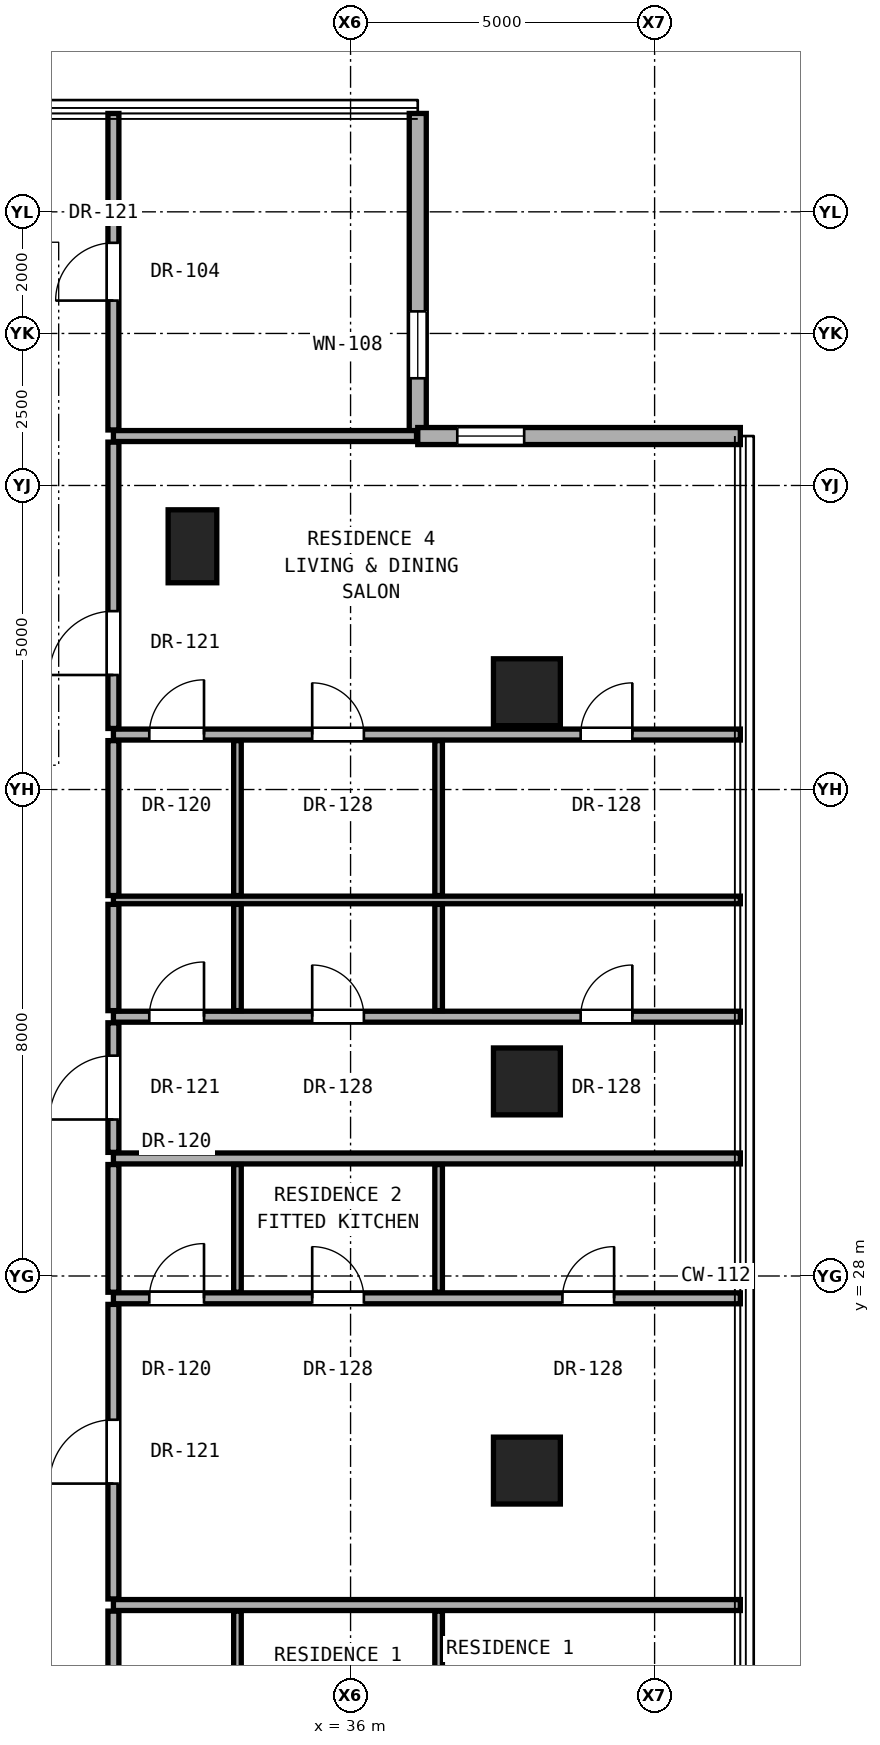
"""IFC4 building model, lengths in metres.
Left out: names, types, materials, properties, quantities, classifications, styles, units other than length and angle.
Written with IfcOpenShell. Run it as: python <this file> out.ifc"""

import sys

from ifc_helpers import new_model, si_unit, direction, frame, frame_2d, origin, origin_2d, place, context, subcontext, project, spatial, rectangle, hollow_rectangle, extrude, element, fill, save


model = new_model("IFC4")
c1 = context("Model", 3, precision=1e-05, world=origin(), true_north=direction((0.0, 1.0)))
c2 = subcontext(c1, "Body", "Model", "MODEL_VIEW")
j1 = project(units=[si_unit("LENGTHUNIT", "METRE"), si_unit("PLANEANGLEUNIT", "RADIAN")], contexts=[c1])
p1 = place(None, origin())
s1 = spatial("IfcSite", under=j1, at=p1, CompositionType="ELEMENT")
p2 = place(p1, origin())
s2 = spatial("IfcBuilding", under=s1, at=p2, CompositionType="ELEMENT")
p3 = place(p2, frame((0.0, 0.0, 108.2)))
s3 = spatial("IfcBuildingStorey", under=s2, at=p3, CompositionType="ELEMENT", Elevation=108.2)
for number, where, z_axis, x_axis in (
    (1, (38.9, 24.8, 0.0), (0.0, 0.0, 1.0), (1.0, 0.0, 0.0)),
    (2, (38.9, 31.2, 0.0), (0.0, 0.0, 1.0), (1.0, 0.0, 0.0)),
    (3, (38.9, 37.6, 0.0), (0.0, 0.0, 1.0), (1.0, 0.0, 0.0)),
):
    element("IfcColumn", number, at=place(p3, frame(where, z_axis=z_axis, x_axis=x_axis)), inside=s3, PredefinedType="COLUMN", context=c2, shape_type="SweptSolid", body=[
        extrude(hollow_rectangle(XDim=1.1, YDim=1.1, WallThickness=0.06, at=origin_2d()), origin(), (0.0, 0.0, 1.0), 3.3),
    ])
p4 = place(p3, frame((33.4, 40.0, 0.0), z_axis=(0.0, 0.0, 1.0), x_axis=(1.0, 0.0, 0.0)))
e4 = element("IfcColumn", 4, at=p4, inside=s3, PredefinedType="PILASTER", context=c2, shape_type="SweptSolid", body=[
    extrude(rectangle(XDim=0.8, YDim=1.2, at=origin_2d()), origin(), (0.0, 0.0, 1.0), 3.3),
])
p5 = place(p3, frame((37.105, 41.813, 0.0), z_axis=(0.0, 0.0, 1.0), x_axis=(0.0, 1.0, 0.0)))
e5 = element("IfcWall", 5, at=p5, inside=s3, PredefinedType="SOLIDWALL", context=c2, shape_type="SweptSolid", body=[
    extrude(rectangle(XDim=5.305, YDim=0.28, at=frame_2d((2.652, 0.0))), origin(), (0.0, 0.0, 1.0), 3.06),
])
p6 = place(p5, frame((0.95, 0.0, 0.85)))
e6 = element("IfcOpeningElement", 6, at=p6, cuts=e5, PredefinedType="OPENING", context=c2, shape_type="SweptSolid", body=[
    extrude(rectangle(XDim=1.1, YDim=2.0, at=frame_2d((0.55, 1.0))), frame((0.0, 0.15, 0.0), z_axis=(0.0, -1.0, 0.0), x_axis=(1.0, 0.0, 0.0)), (0.0, 0.0, 1.0), 0.3),
])
p7 = place(p3, frame((42.41, 41.813, 0.0), z_axis=(0.0, 0.0, 1.0), x_axis=(-1.0, 0.0, 0.0)))
e7 = element("IfcWall", 7, at=p7, inside=s3, PredefinedType="SOLIDWALL", context=c2, shape_type="SweptSolid", body=[
    extrude(rectangle(XDim=5.305, YDim=0.28, at=frame_2d((2.652, 0.0))), origin(), (0.0, 0.0, 1.0), 3.06),
])
p8 = place(p7, frame((3.555, 0.0, 0.85)))
e8 = element("IfcOpeningElement", 8, at=p8, cuts=e7, PredefinedType="OPENING", context=c2, shape_type="SweptSolid", body=[
    extrude(rectangle(XDim=1.1, YDim=2.0, at=frame_2d((0.55, 1.0))), frame((0.0, 0.15, 0.0), z_axis=(0.0, -1.0, 0.0), x_axis=(1.0, 0.0, 0.0)), (0.0, 0.0, 1.0), 0.3),
])
p9 = place(p3, frame((32.1, 22.589, 0.0), z_axis=(0.0, 0.0, 1.0), x_axis=(1.0, 0.0, 0.0)))
e9 = element("IfcWall", 9, at=p9, inside=s3, PredefinedType="PARTITIONING", context=c2, shape_type="SweptSolid", body=[
    extrude(rectangle(XDim=10.31, YDim=0.18, at=frame_2d((5.155, 0.0))), origin(), (0.0, 0.0, 1.0), 2.145),
])
p10 = place(p3, frame((32.1, 27.633, 0.0), z_axis=(0.0, 0.0, 1.0), x_axis=(1.0, 0.0, 0.0)))
e10 = element("IfcWall", 10, at=p10, inside=s3, PredefinedType="PARTITIONING", context=c2, shape_type="SweptSolid", body=[
    extrude(rectangle(XDim=10.31, YDim=0.18, at=frame_2d((5.155, 0.0))), origin(), (0.0, 0.0, 1.0), 2.145),
])
p11 = place(p10, frame((7.384, 0.0, 0.0)))
e11 = element("IfcOpeningElement", 11, at=p11, cuts=e10, PredefinedType="OPENING", context=c2, shape_type="SweptSolid", body=[
    extrude(rectangle(XDim=0.85, YDim=2.01, at=frame_2d((0.425, 1.005))), frame((0.0, 0.1, 0.0), z_axis=(0.0, -1.0, 0.0), x_axis=(1.0, 0.0, 0.0)), (0.0, 0.0, 1.0), 0.2),
])
p12 = place(p10, frame((3.269, 0.0, 0.0)))
e12 = element("IfcOpeningElement", 12, at=p12, cuts=e10, PredefinedType="OPENING", context=c2, shape_type="SweptSolid", body=[
    extrude(rectangle(XDim=0.85, YDim=2.01, at=frame_2d((0.425, 1.005))), frame((0.0, 0.1, 0.0), z_axis=(0.0, -1.0, 0.0), x_axis=(1.0, 0.0, 0.0)), (0.0, 0.0, 1.0), 0.2),
])
p13 = place(p10, frame((0.59, 0.0, 0.0)))
e13 = element("IfcOpeningElement", 13, at=p13, cuts=e10, PredefinedType="OPENING", context=c2, shape_type="SweptSolid", body=[
    extrude(rectangle(XDim=0.9, YDim=2.1, at=frame_2d((0.45, 1.05))), frame((0.0, 0.1, 0.0), z_axis=(0.0, -1.0, 0.0), x_axis=(1.0, 0.0, 0.0)), (0.0, 0.0, 1.0), 0.2),
])
p14 = place(p3, frame((32.1, 29.933, 0.0), z_axis=(0.0, 0.0, 1.0), x_axis=(1.0, 0.0, 0.0)))
e14 = element("IfcWall", 14, at=p14, inside=s3, PredefinedType="PARTITIONING", context=c2, shape_type="SweptSolid", body=[
    extrude(rectangle(XDim=10.31, YDim=0.18, at=frame_2d((5.155, 0.0))), origin(), (0.0, 0.0, 1.0), 2.145),
])
p15 = place(p3, frame((32.1, 32.264, 0.0), z_axis=(0.0, 0.0, 1.0), x_axis=(1.0, 0.0, 0.0)))
e15 = element("IfcWall", 15, at=p15, inside=s3, PredefinedType="PARTITIONING", context=c2, shape_type="SweptSolid", body=[
    extrude(rectangle(XDim=10.31, YDim=0.18, at=frame_2d((5.155, 0.0))), origin(), (0.0, 0.0, 1.0), 2.145),
])
p16 = place(p15, frame((7.684, 0.0, 0.0)))
e16 = element("IfcOpeningElement", 16, at=p16, cuts=e15, PredefinedType="OPENING", context=c2, shape_type="SweptSolid", body=[
    extrude(rectangle(XDim=0.85, YDim=2.01, at=frame_2d((0.425, 1.005))), frame((0.0, 0.1, 0.0), z_axis=(0.0, -1.0, 0.0), x_axis=(1.0, 0.0, 0.0)), (0.0, 0.0, 1.0), 0.2),
])
p17 = place(p15, frame((3.269, 0.0, 0.0)))
e17 = element("IfcOpeningElement", 17, at=p17, cuts=e15, PredefinedType="OPENING", context=c2, shape_type="SweptSolid", body=[
    extrude(rectangle(XDim=0.85, YDim=2.01, at=frame_2d((0.425, 1.005))), frame((0.0, 0.1, 0.0), z_axis=(0.0, -1.0, 0.0), x_axis=(1.0, 0.0, 0.0)), (0.0, 0.0, 1.0), 0.2),
])
p18 = place(p15, frame((0.59, 0.0, 0.0)))
e18 = element("IfcOpeningElement", 18, at=p18, cuts=e15, PredefinedType="OPENING", context=c2, shape_type="SweptSolid", body=[
    extrude(rectangle(XDim=0.9, YDim=2.1, at=frame_2d((0.45, 1.05))), frame((0.0, 0.1, 0.0), z_axis=(0.0, -1.0, 0.0), x_axis=(1.0, 0.0, 0.0)), (0.0, 0.0, 1.0), 0.2),
])
p19 = place(p3, frame((32.1, 34.184, 0.0), z_axis=(0.0, 0.0, 1.0), x_axis=(1.0, 0.0, 0.0)))
e19 = element("IfcWall", 19, at=p19, inside=s3, PredefinedType="PARTITIONING", context=c2, shape_type="SweptSolid", body=[
    extrude(rectangle(XDim=10.31, YDim=0.125, at=frame_2d((5.155, 0.0))), origin(), (0.0, 0.0, 1.0), 2.145),
])
p20 = place(p3, frame((32.1, 36.904, 0.0), z_axis=(0.0, 0.0, 1.0), x_axis=(1.0, 0.0, 0.0)))
e20 = element("IfcWall", 20, at=p20, inside=s3, PredefinedType="PARTITIONING", context=c2, shape_type="SweptSolid", body=[
    extrude(rectangle(XDim=10.31, YDim=0.18, at=frame_2d((5.155, 0.0))), origin(), (0.0, 0.0, 1.0), 2.145),
])
p21 = place(p20, frame((7.684, 0.0, 0.0)))
e21 = element("IfcOpeningElement", 21, at=p21, cuts=e20, PredefinedType="OPENING", context=c2, shape_type="SweptSolid", body=[
    extrude(rectangle(XDim=0.85, YDim=2.01, at=frame_2d((0.425, 1.005))), frame((0.0, 0.1, 0.0), z_axis=(0.0, -1.0, 0.0), x_axis=(1.0, 0.0, 0.0)), (0.0, 0.0, 1.0), 0.2),
])
p22 = place(p20, frame((3.269, 0.0, 0.0)))
e22 = element("IfcOpeningElement", 22, at=p22, cuts=e20, PredefinedType="OPENING", context=c2, shape_type="SweptSolid", body=[
    extrude(rectangle(XDim=0.85, YDim=2.01, at=frame_2d((0.425, 1.005))), frame((0.0, 0.1, 0.0), z_axis=(0.0, -1.0, 0.0), x_axis=(1.0, 0.0, 0.0)), (0.0, 0.0, 1.0), 0.2),
])
p23 = place(p20, frame((0.59, 0.0, 0.0)))
e23 = element("IfcOpeningElement", 23, at=p23, cuts=e20, PredefinedType="OPENING", context=c2, shape_type="SweptSolid", body=[
    extrude(rectangle(XDim=0.9, YDim=2.1, at=frame_2d((0.45, 1.05))), frame((0.0, 0.1, 0.0), z_axis=(0.0, -1.0, 0.0), x_axis=(1.0, 0.0, 0.0)), (0.0, 0.0, 1.0), 0.2),
])
p24 = place(p3, frame((32.1, 41.813, 0.0), z_axis=(0.0, 0.0, 1.0), x_axis=(1.0, 0.0, 0.0)))
e24 = element("IfcWall", 24, at=p24, inside=s3, PredefinedType="PARTITIONING", context=c2, shape_type="SweptSolid", body=[
    extrude(rectangle(XDim=4.985, YDim=0.18, at=frame_2d((2.492, 0.0))), origin(), (0.0, 0.0, 1.0), 3.08),
])
p25 = place(p3, frame((32.1, 19.969, 0.0), z_axis=(0.0, 0.0, 1.0), x_axis=(0.0, 1.0, 0.0)))
e25 = element("IfcWall", 25, at=p25, inside=s3, PredefinedType="PARTITIONING", context=c2, shape_type="SweptSolid", body=[
    extrude(rectangle(XDim=2.52, YDim=0.18, at=frame_2d((1.26, 0.0))), origin(), (0.0, 0.0, 1.0), 3.08),
])
p26 = place(p3, frame((32.1, 22.689, 0.0), z_axis=(0.0, 0.0, 1.0), x_axis=(0.0, 1.0, 0.0)))
e26 = element("IfcWall", 26, at=p26, inside=s3, PredefinedType="PARTITIONING", context=c2, shape_type="SweptSolid", body=[
    extrude(rectangle(XDim=4.844, YDim=0.18, at=frame_2d((2.422, 0.0))), origin(), (0.0, 0.0, 1.0), 2.299),
])
p27 = place(p26, frame((1.897, 0.0, 0.0)))
e27 = element("IfcOpeningElement", 27, at=p27, cuts=e26, PredefinedType="OPENING", context=c2, shape_type="SweptSolid", body=[
    extrude(rectangle(XDim=1.05, YDim=2.2, at=frame_2d((0.525, 1.1))), frame((0.0, 0.1, 0.0), z_axis=(0.0, -1.0, 0.0), x_axis=(1.0, 0.0, 0.0)), (0.0, 0.0, 1.0), 0.2),
])
p28 = place(p3, frame((32.1, 27.733, 0.0), z_axis=(0.0, 0.0, 1.0), x_axis=(0.0, 1.0, 0.0)))
e28 = element("IfcWall", 28, at=p28, inside=s3, PredefinedType="PARTITIONING", context=c2, shape_type="SweptSolid", body=[
    extrude(rectangle(XDim=2.1, YDim=0.18, at=frame_2d((1.05, 0.0))), origin(), (0.0, 0.0, 1.0), 3.08),
])
p29 = place(p3, frame((32.1, 30.033, 0.0), z_axis=(0.0, 0.0, 1.0), x_axis=(0.0, 1.0, 0.0)))
e29 = element("IfcWall", 29, at=p29, inside=s3, PredefinedType="PARTITIONING", context=c2, shape_type="SweptSolid", body=[
    extrude(rectangle(XDim=2.131, YDim=0.18, at=frame_2d((1.065, 0.0))), origin(), (0.0, 0.0, 1.0), 2.299),
])
p30 = place(p29, frame((0.541, 0.0, 0.0)))
e30 = element("IfcOpeningElement", 30, at=p30, cuts=e29, PredefinedType="OPENING", context=c2, shape_type="SweptSolid", body=[
    extrude(rectangle(XDim=1.05, YDim=2.2, at=frame_2d((0.525, 1.1))), frame((0.0, 0.1, 0.0), z_axis=(0.0, -1.0, 0.0), x_axis=(1.0, 0.0, 0.0)), (0.0, 0.0, 1.0), 0.2),
])
p31 = place(p3, frame((32.1, 32.364, 0.0), z_axis=(0.0, 0.0, 1.0), x_axis=(0.0, 1.0, 0.0)))
e31 = element("IfcWall", 31, at=p31, inside=s3, PredefinedType="PARTITIONING", context=c2, shape_type="SweptSolid", body=[
    extrude(rectangle(XDim=1.748, YDim=0.18, at=frame_2d((0.874, 0.0))), origin(), (0.0, 0.0, 1.0), 3.08),
])
p32 = place(p3, frame((32.1, 34.257, 0.0), z_axis=(0.0, 0.0, 1.0), x_axis=(0.0, 1.0, 0.0)))
e32 = element("IfcWall", 32, at=p32, inside=s3, PredefinedType="PARTITIONING", context=c2, shape_type="SweptSolid", body=[
    extrude(rectangle(XDim=2.547, YDim=0.18, at=frame_2d((1.274, 0.0))), origin(), (0.0, 0.0, 1.0), 3.08),
])
p33 = place(p3, frame((32.1, 37.004, 0.0), z_axis=(0.0, 0.0, 1.0), x_axis=(0.0, 1.0, 0.0)))
e33 = element("IfcWall", 33, at=p33, inside=s3, PredefinedType="PARTITIONING", context=c2, shape_type="SweptSolid", body=[
    extrude(rectangle(XDim=4.709, YDim=0.18, at=frame_2d((2.354, 0.0))), origin(), (0.0, 0.0, 1.0), 2.456),
])
p34 = place(p33, frame((0.879, 0.0, 0.0)))
e34 = element("IfcOpeningElement", 34, at=p34, cuts=e33, PredefinedType="OPENING", context=c2, shape_type="SweptSolid", body=[
    extrude(rectangle(XDim=1.05, YDim=2.2, at=frame_2d((0.525, 1.1))), frame((0.0, 0.1, 0.0), z_axis=(0.0, -1.0, 0.0), x_axis=(1.0, 0.0, 0.0)), (0.0, 0.0, 1.0), 0.2),
])
p35 = place(p3, frame((32.1, 41.913, 0.0), z_axis=(0.0, 0.0, 1.0), x_axis=(0.0, 1.0, 0.0)))
e35 = element("IfcWall", 35, at=p35, inside=s3, PredefinedType="PARTITIONING", context=c2, shape_type="SweptSolid", body=[
    extrude(rectangle(XDim=5.205, YDim=0.18, at=frame_2d((2.603, 0.0))), origin(), (0.0, 0.0, 1.0), 3.08),
])
p36 = place(p35, frame((2.127, 0.0, 0.0)))
e36 = element("IfcOpeningElement", 36, at=p36, cuts=e35, PredefinedType="OPENING", context=c2, shape_type="SweptSolid", body=[
    extrude(rectangle(XDim=0.95, YDim=2.15, at=frame_2d((0.475, 1.075))), frame((0.0, 0.1, 0.0), z_axis=(0.0, -1.0, 0.0), x_axis=(1.0, 0.0, 0.0)), (0.0, 0.0, 1.0), 0.2),
])
p37 = place(p3, frame((34.14, 19.969, 0.0), z_axis=(0.0, 0.0, 1.0), x_axis=(0.0, 1.0, 0.0)))
e37 = element("IfcWall", 37, at=p37, inside=s3, PredefinedType="PARTITIONING", context=c2, shape_type="SweptSolid", body=[
    extrude(rectangle(XDim=2.52, YDim=0.125, at=frame_2d((1.26, 0.0))), origin(), (0.0, 0.0, 1.0), 3.08),
])
p38 = place(p3, frame((34.14, 27.733, 0.0), z_axis=(0.0, 0.0, 1.0), x_axis=(0.0, 1.0, 0.0)))
e38 = element("IfcWall", 38, at=p38, inside=s3, PredefinedType="PARTITIONING", context=c2, shape_type="SweptSolid", body=[
    extrude(rectangle(XDim=2.1, YDim=0.125, at=frame_2d((1.05, 0.0))), origin(), (0.0, 0.0, 1.0), 3.08),
])
p39 = place(p3, frame((34.14, 32.364, 0.0), z_axis=(0.0, 0.0, 1.0), x_axis=(0.0, 1.0, 0.0)))
e39 = element("IfcWall", 39, at=p39, inside=s3, PredefinedType="PARTITIONING", context=c2, shape_type="SweptSolid", body=[
    extrude(rectangle(XDim=1.748, YDim=0.125, at=frame_2d((0.874, 0.0))), origin(), (0.0, 0.0, 1.0), 3.08),
])
p40 = place(p3, frame((34.14, 34.257, 0.0), z_axis=(0.0, 0.0, 1.0), x_axis=(0.0, 1.0, 0.0)))
e40 = element("IfcWall", 40, at=p40, inside=s3, PredefinedType="PARTITIONING", context=c2, shape_type="SweptSolid", body=[
    extrude(rectangle(XDim=2.547, YDim=0.125, at=frame_2d((1.274, 0.0))), origin(), (0.0, 0.0, 1.0), 3.08),
])
p41 = place(p3, frame((37.448, 19.969, 0.0), z_axis=(0.0, 0.0, 1.0), x_axis=(0.0, 1.0, 0.0)))
e41 = element("IfcWall", 41, at=p41, inside=s3, PredefinedType="PARTITIONING", context=c2, shape_type="SweptSolid", body=[
    extrude(rectangle(XDim=2.52, YDim=0.125, at=frame_2d((1.26, 0.0))), origin(), (0.0, 0.0, 1.0), 3.08),
])
p42 = place(p3, frame((37.448, 27.733, 0.0), z_axis=(0.0, 0.0, 1.0), x_axis=(0.0, 1.0, 0.0)))
e42 = element("IfcWall", 42, at=p42, inside=s3, PredefinedType="PARTITIONING", context=c2, shape_type="SweptSolid", body=[
    extrude(rectangle(XDim=2.1, YDim=0.125, at=frame_2d((1.05, 0.0))), origin(), (0.0, 0.0, 1.0), 3.08),
])
p43 = place(p3, frame((37.448, 32.364, 0.0), z_axis=(0.0, 0.0, 1.0), x_axis=(0.0, 1.0, 0.0)))
e43 = element("IfcWall", 43, at=p43, inside=s3, PredefinedType="PARTITIONING", context=c2, shape_type="SweptSolid", body=[
    extrude(rectangle(XDim=1.748, YDim=0.125, at=frame_2d((0.874, 0.0))), origin(), (0.0, 0.0, 1.0), 3.08),
])
p44 = place(p3, frame((37.448, 34.257, 0.0), z_axis=(0.0, 0.0, 1.0), x_axis=(0.0, 1.0, 0.0)))
e44 = element("IfcWall", 44, at=p44, inside=s3, PredefinedType="PARTITIONING", context=c2, shape_type="SweptSolid", body=[
    extrude(rectangle(XDim=2.547, YDim=0.125, at=frame_2d((1.274, 0.0))), origin(), (0.0, 0.0, 1.0), 3.08),
])
p45 = place(p6, origin())
e45 = element("IfcWindow", 45, at=p45, inside=s3, PartitioningType="SINGLE_PANEL", PredefinedType="WINDOW", context=c2, shape_type="SweptSolid", body=[
    extrude(rectangle(XDim=1.1, YDim=2.0, at=frame_2d((0.55, 1.0))), frame((0.0, 0.03, 0.0), z_axis=(0.0, -1.0, 0.0), x_axis=(1.0, 0.0, 0.0)), (0.0, 0.0, 1.0), 0.06),
])
fill(e6, e45)
p46 = place(p8, origin())
e46 = element("IfcWindow", 46, at=p46, inside=s3, PartitioningType="SINGLE_PANEL", PredefinedType="WINDOW", context=c2, shape_type="SweptSolid", body=[
    extrude(rectangle(XDim=1.1, YDim=2.0, at=frame_2d((0.55, 1.0))), frame((0.0, 0.03, 0.0), z_axis=(0.0, -1.0, 0.0), x_axis=(1.0, 0.0, 0.0)), (0.0, 0.0, 1.0), 0.06),
])
fill(e8, e46)
p47 = place(p27, origin())
e47 = element("IfcDoor", 47, at=p47, inside=s3, OperationType="SINGLE_SWING_LEFT", PredefinedType="DOOR", context=c2, shape_type="SweptSolid", body=[
    extrude(rectangle(XDim=1.05, YDim=2.2, at=frame_2d((0.525, 1.1))), frame((0.0, 0.025, 0.0), z_axis=(0.0, -1.0, 0.0), x_axis=(1.0, 0.0, 0.0)), (0.0, 0.0, 1.0), 0.05),
])
fill(e27, e47)
p48 = place(p11, origin())
e48 = element("IfcDoor", 48, at=p48, inside=s3, OperationType="SINGLE_SWING_RIGHT", PredefinedType="DOOR", context=c2, shape_type="SweptSolid", body=[
    extrude(rectangle(XDim=0.85, YDim=2.01, at=frame_2d((0.425, 1.005))), frame((0.0, 0.025, 0.0), z_axis=(0.0, -1.0, 0.0), x_axis=(1.0, 0.0, 0.0)), (0.0, 0.0, 1.0), 0.05),
])
fill(e11, e48)
p49 = place(p12, origin())
e49 = element("IfcDoor", 49, at=p49, inside=s3, OperationType="SINGLE_SWING_LEFT", PredefinedType="DOOR", context=c2, shape_type="SweptSolid", body=[
    extrude(rectangle(XDim=0.85, YDim=2.01, at=frame_2d((0.425, 1.005))), frame((0.0, 0.025, 0.0), z_axis=(0.0, -1.0, 0.0), x_axis=(1.0, 0.0, 0.0)), (0.0, 0.0, 1.0), 0.05),
])
fill(e12, e49)
p50 = place(p13, origin())
e50 = element("IfcDoor", 50, at=p50, inside=s3, OperationType="SINGLE_SWING_RIGHT", PredefinedType="DOOR", context=c2, shape_type="SweptSolid", body=[
    extrude(rectangle(XDim=0.9, YDim=2.1, at=frame_2d((0.45, 1.05))), frame((0.0, 0.025, 0.0), z_axis=(0.0, -1.0, 0.0), x_axis=(1.0, 0.0, 0.0)), (0.0, 0.0, 1.0), 0.05),
])
fill(e13, e50)
p51 = place(p30, origin())
e51 = element("IfcDoor", 51, at=p51, inside=s3, OperationType="SINGLE_SWING_LEFT", PredefinedType="DOOR", context=c2, shape_type="SweptSolid", body=[
    extrude(rectangle(XDim=1.05, YDim=2.2, at=frame_2d((0.525, 1.1))), frame((0.0, 0.025, 0.0), z_axis=(0.0, -1.0, 0.0), x_axis=(1.0, 0.0, 0.0)), (0.0, 0.0, 1.0), 0.05),
])
fill(e30, e51)
p52 = place(p16, origin())
e52 = element("IfcDoor", 52, at=p52, inside=s3, OperationType="SINGLE_SWING_RIGHT", PredefinedType="DOOR", context=c2, shape_type="SweptSolid", body=[
    extrude(rectangle(XDim=0.85, YDim=2.01, at=frame_2d((0.425, 1.005))), frame((0.0, 0.025, 0.0), z_axis=(0.0, -1.0, 0.0), x_axis=(1.0, 0.0, 0.0)), (0.0, 0.0, 1.0), 0.05),
])
fill(e16, e52)
p53 = place(p17, origin())
e53 = element("IfcDoor", 53, at=p53, inside=s3, OperationType="SINGLE_SWING_LEFT", PredefinedType="DOOR", context=c2, shape_type="SweptSolid", body=[
    extrude(rectangle(XDim=0.85, YDim=2.01, at=frame_2d((0.425, 1.005))), frame((0.0, 0.025, 0.0), z_axis=(0.0, -1.0, 0.0), x_axis=(1.0, 0.0, 0.0)), (0.0, 0.0, 1.0), 0.05),
])
fill(e17, e53)
p54 = place(p18, origin())
e54 = element("IfcDoor", 54, at=p54, inside=s3, OperationType="SINGLE_SWING_RIGHT", PredefinedType="DOOR", context=c2, shape_type="SweptSolid", body=[
    extrude(rectangle(XDim=0.9, YDim=2.1, at=frame_2d((0.45, 1.05))), frame((0.0, 0.025, 0.0), z_axis=(0.0, -1.0, 0.0), x_axis=(1.0, 0.0, 0.0)), (0.0, 0.0, 1.0), 0.05),
])
fill(e18, e54)
p55 = place(p34, origin())
e55 = element("IfcDoor", 55, at=p55, inside=s3, OperationType="SINGLE_SWING_LEFT", PredefinedType="DOOR", context=c2, shape_type="SweptSolid", body=[
    extrude(rectangle(XDim=1.05, YDim=2.2, at=frame_2d((0.525, 1.1))), frame((0.0, 0.025, 0.0), z_axis=(0.0, -1.0, 0.0), x_axis=(1.0, 0.0, 0.0)), (0.0, 0.0, 1.0), 0.05),
])
fill(e34, e55)
p56 = place(p21, origin())
e56 = element("IfcDoor", 56, at=p56, inside=s3, OperationType="SINGLE_SWING_RIGHT", PredefinedType="DOOR", context=c2, shape_type="SweptSolid", body=[
    extrude(rectangle(XDim=0.85, YDim=2.01, at=frame_2d((0.425, 1.005))), frame((0.0, 0.025, 0.0), z_axis=(0.0, -1.0, 0.0), x_axis=(1.0, 0.0, 0.0)), (0.0, 0.0, 1.0), 0.05),
])
fill(e21, e56)
p57 = place(p22, origin())
e57 = element("IfcDoor", 57, at=p57, inside=s3, OperationType="SINGLE_SWING_LEFT", PredefinedType="DOOR", context=c2, shape_type="SweptSolid", body=[
    extrude(rectangle(XDim=0.85, YDim=2.01, at=frame_2d((0.425, 1.005))), frame((0.0, 0.025, 0.0), z_axis=(0.0, -1.0, 0.0), x_axis=(1.0, 0.0, 0.0)), (0.0, 0.0, 1.0), 0.05),
])
fill(e22, e57)
p58 = place(p23, origin())
e58 = element("IfcDoor", 58, at=p58, inside=s3, OperationType="SINGLE_SWING_RIGHT", PredefinedType="DOOR", context=c2, shape_type="SweptSolid", body=[
    extrude(rectangle(XDim=0.9, YDim=2.1, at=frame_2d((0.45, 1.05))), frame((0.0, 0.025, 0.0), z_axis=(0.0, -1.0, 0.0), x_axis=(1.0, 0.0, 0.0)), (0.0, 0.0, 1.0), 0.05),
])
fill(e23, e58)
p59 = place(p36, origin())
e59 = element("IfcDoor", 59, at=p59, inside=s3, OperationType="SINGLE_SWING_LEFT", PredefinedType="DOOR", context=c2, shape_type="SweptSolid", body=[
    extrude(rectangle(XDim=0.95, YDim=2.15, at=frame_2d((0.475, 1.075))), frame((0.0, 0.025, 0.0), z_axis=(0.0, -1.0, 0.0), x_axis=(1.0, 0.0, 0.0)), (0.0, 0.0, 1.0), 0.05),
])
fill(e36, e59)
save(model, sys.argv[1])
